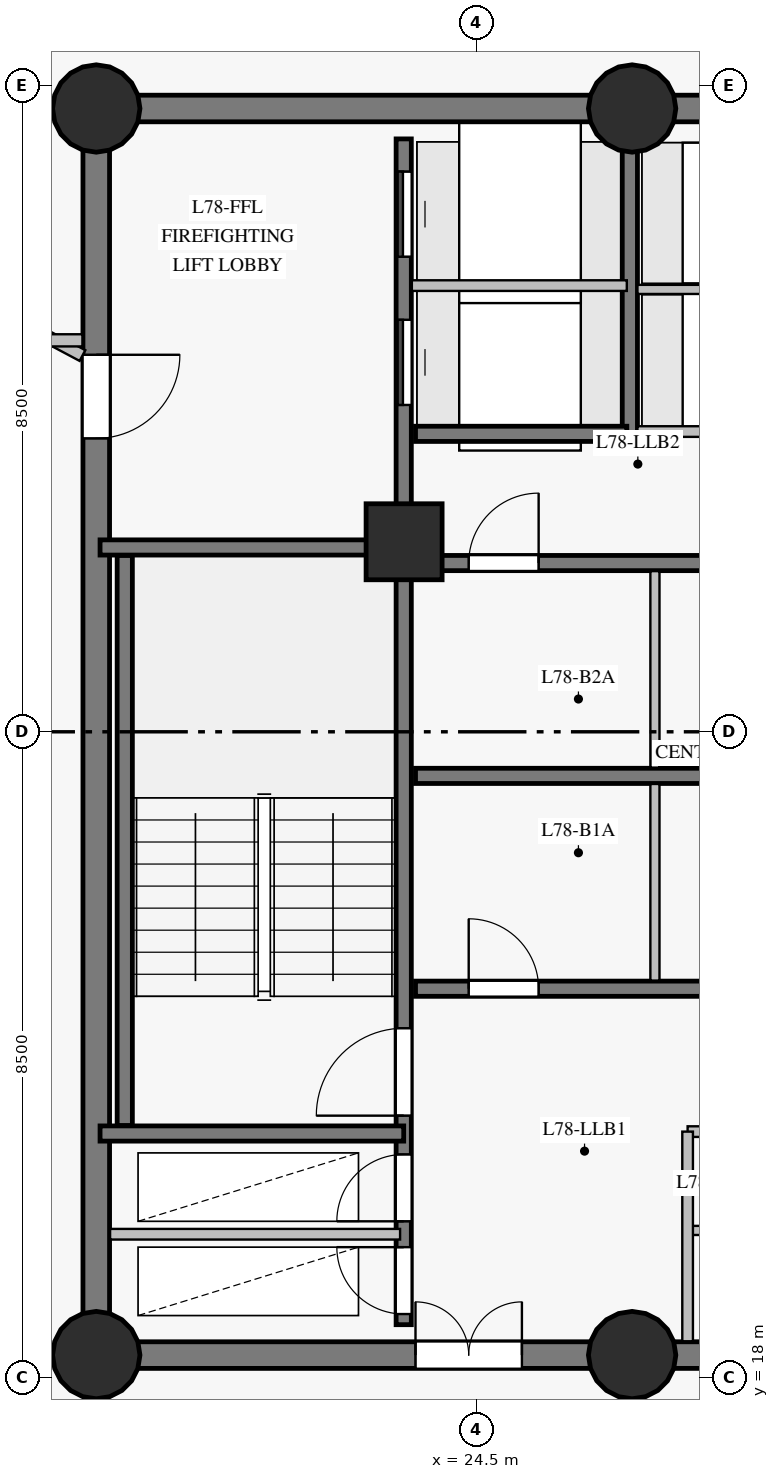
"""IFC4 building model, lengths in metres.
Left out: names, types, materials, properties, quantities, classifications, styles, units other than length and angle.
Written with IfcOpenShell. Run it as: python <this file> out.ifc"""

import sys

from ifc_helpers import new_model, si_unit, direction, frame, frame_2d, origin, origin_with_axes, origin_2d, place, context, subcontext, project, spatial, rectangle, circle, extrude, source, transform, mapped, element, fill, save


model = new_model("IFC4")
c1 = context("Model", 3, precision=1e-05, world=origin(), true_north=direction((0.0, 1.0)))
c2 = subcontext(c1, "Body", "Model", "MODEL_VIEW")
j1 = project(units=[si_unit("LENGTHUNIT", "METRE"), si_unit("PLANEANGLEUNIT", "RADIAN")], contexts=[c1])
p1 = place(None, origin())
s1 = spatial("IfcSite", under=j1, at=p1, CompositionType="ELEMENT")
p2 = place(p1, origin())
s2 = spatial("IfcBuilding", under=s1, at=p2, CompositionType="ELEMENT")
p3 = place(p2, frame((0.0, 0.0, 262.65)))
s3 = spatial("IfcBuildingStorey", under=s2, at=p3, CompositionType="ELEMENT", Elevation=262.65)
p4 = place(p3, frame((19.5, 18.3, 0.0), z_axis=(0.0, 0.0, 1.0), x_axis=(1.0, 0.0, 0.0)))
e1 = element("IfcWall", 1, at=p4, inside=s3, PredefinedType="SHEAR", context=c2, shape_type="SweptSolid", body=[
    extrude(rectangle(XDim=7.05, YDim=0.35, at=frame_2d((3.525, 0.0))), origin(), (0.0, 0.0, 1.0), 2.85),
])
p5 = place(p4, frame((4.2, 0.0, 0.0)))
e2 = element("IfcOpeningElement", 2, at=p5, cuts=e1, PredefinedType="OPENING", context=c2, shape_type="SweptSolid", body=[
    extrude(rectangle(XDim=1.4, YDim=2.2, at=frame_2d((0.7, 1.1))), frame((0.0, 0.185, 0.0), z_axis=(0.0, -1.0, 0.0), x_axis=(1.0, 0.0, 0.0)), (0.0, 0.0, 1.0), 0.37),
])
p6 = place(p3, frame((26.55, 18.3, 0.0), z_axis=(0.0, 0.0, 1.0), x_axis=(1.0, 0.0, 0.0)))
e3 = element("IfcWall", 3, at=p6, inside=s3, PredefinedType="SHEAR", context=c2, shape_type="SweptSolid", body=[
    extrude(rectangle(XDim=10.95, YDim=0.35, at=frame_2d((5.475, 0.0))), origin(), (0.0, 0.0, 1.0), 2.85),
])
p7 = place(p6, frame((4.55, 0.0, 0.0)))
e4 = element("IfcOpeningElement", 4, at=p7, cuts=e3, PredefinedType="OPENING", context=c2, shape_type="SweptSolid", body=[
    extrude(rectangle(XDim=1.4, YDim=2.2, at=frame_2d((0.7, 1.1))), frame((0.0, 0.185, 0.0), z_axis=(0.0, -1.0, 0.0), x_axis=(1.0, 0.0, 0.0)), (0.0, 0.0, 1.0), 0.37),
])
p8 = place(p3, frame((37.5, 34.7, 0.0), z_axis=(0.0, 0.0, 1.0), x_axis=(-1.0, 0.0, 0.0)))
e5 = element("IfcWall", 5, at=p8, inside=s3, PredefinedType="SHEAR", context=c2, shape_type="SweptSolid", body=[
    extrude(rectangle(XDim=10.95, YDim=0.35, at=frame_2d((5.475, 0.0))), origin(), (0.0, 0.0, 1.0), 2.85),
])
p9 = place(p8, frame((2.15, 0.0, 0.0)))
e6 = element("IfcOpeningElement", 6, at=p9, cuts=e5, PredefinedType="OPENING", context=c2, shape_type="SweptSolid", body=[
    extrude(rectangle(XDim=1.2, YDim=2.15, at=frame_2d((0.6, 1.075))), frame((0.0, 0.185, 0.0), z_axis=(0.0, -1.0, 0.0), x_axis=(1.0, 0.0, 0.0)), (0.0, 0.0, 1.0), 0.37),
])
p10 = place(p8, frame((6.35, 0.0, 0.0)))
e7 = element("IfcOpeningElement", 7, at=p10, cuts=e5, PredefinedType="OPENING", context=c2, shape_type="SweptSolid", body=[
    extrude(rectangle(XDim=1.1, YDim=2.15, at=frame_2d((0.55, 1.075))), frame((0.0, 0.185, 0.0), z_axis=(0.0, -1.0, 0.0), x_axis=(1.0, 0.0, 0.0)), (0.0, 0.0, 1.0), 0.37),
])
p11 = place(p3, frame((26.55, 34.7, 0.0), z_axis=(0.0, 0.0, 1.0), x_axis=(-1.0, 0.0, 0.0)))
e8 = element("IfcWall", 8, at=p11, inside=s3, PredefinedType="SHEAR", context=c2, shape_type="SweptSolid", body=[
    extrude(rectangle(XDim=7.05, YDim=0.35, at=frame_2d((3.525, 0.0))), origin(), (0.0, 0.0, 1.0), 2.85),
])
p12 = place(p3, frame((19.5, 34.7, 0.0), z_axis=(0.0, 0.0, 1.0), x_axis=(0.0, -1.0, 0.0)))
e9 = element("IfcWall", 9, at=p12, inside=s3, PredefinedType="SHEAR", context=c2, shape_type="SweptSolid", body=[
    extrude(rectangle(XDim=16.4, YDim=0.35, at=frame_2d((8.2, 0.0))), origin(), (0.0, 0.0, 1.0), 2.85),
])
p13 = place(p12, frame((3.24, 0.0, 0.0)))
e10 = element("IfcOpeningElement", 10, at=p13, cuts=e9, PredefinedType="OPENING", context=c2, shape_type="SweptSolid", body=[
    extrude(rectangle(XDim=1.1, YDim=2.15, at=frame_2d((0.55, 1.075))), frame((0.0, 0.185, 0.0), z_axis=(0.0, -1.0, 0.0), x_axis=(1.0, 0.0, 0.0)), (0.0, 0.0, 1.0), 0.37),
])
m1 = source(origin_with_axes(), c2, "Body", "SweptSolid", [
    extrude(circle(Radius=0.575, at=origin_2d()), origin(), (0.0, 0.0, 1.0), 3.05),
])
for number, where, z_axis, x_axis in (
    (11, (19.5, 18.3, 0.0), (0.0, 0.0, 1.0), (1.0, 0.0, 0.0)),
    (12, (26.55, 18.3, 0.0), (0.0, 0.0, 1.0), (1.0, 0.0, 0.0)),
    (13, (19.5, 34.7, 0.0), (0.0, 0.0, 1.0), (1.0, 0.0, 0.0)),
    (14, (26.55, 34.7, 0.0), (0.0, 0.0, 1.0), (1.0, 0.0, 0.0)),
):
    element("IfcColumn", number, at=place(p3, frame(where, z_axis=z_axis, x_axis=x_axis)), inside=s3, PredefinedType="COLUMN", context=c2, shape_type="MappedRepresentation", body=[
        mapped(m1, transform((0.0, 0.0, 0.0), scale=1.0)),
    ])
m2 = source(origin_with_axes(), c2, "Body", "SweptSolid", [
    extrude(rectangle(XDim=1.0, YDim=1.0, at=origin_2d()), origin(), (0.0, 0.0, 1.0), 3.05),
])
p14 = place(p3, frame((23.55, 29.0, 0.0), z_axis=(0.0, 0.0, 1.0), x_axis=(1.0, 0.0, 0.0)))
e15 = element("IfcColumn", 15, at=p14, inside=s3, PredefinedType="COLUMN", context=c2, shape_type="MappedRepresentation", body=[
    mapped(m2, transform((0.0, 0.0, 0.0), scale=1.0)),
])
p15 = place(p3, frame((23.545, 18.7, 0.0), z_axis=(0.0, 0.0, 1.0), x_axis=(0.0, 1.0, 0.0)))
e16 = element("IfcWall", 16, at=p15, inside=s3, PredefinedType="SHEAR", context=c2, shape_type="SweptSolid", body=[
    extrude(rectangle(XDim=15.6, YDim=0.2, at=frame_2d((7.8, 0.0))), origin(), (0.0, 0.0, 1.0), 2.85),
])
p16 = place(p15, frame((2.75, 0.0, 0.0)))
e17 = element("IfcOpeningElement", 17, at=p16, cuts=e16, PredefinedType="OPENING", context=c2, shape_type="SweptSolid", body=[
    extrude(rectangle(XDim=1.15, YDim=2.15, at=frame_2d((0.575, 1.075))), frame((0.0, 0.11, 0.0), z_axis=(0.0, -1.0, 0.0), x_axis=(1.0, 0.0, 0.0)), (0.0, 0.0, 1.0), 0.22),
])
p17 = place(p15, frame((0.14, 0.0, 0.0)))
e18 = element("IfcOpeningElement", 18, at=p17, cuts=e16, PredefinedType="OPENING", context=c2, shape_type="SweptSolid", body=[
    extrude(rectangle(XDim=0.88, YDim=2.1, at=frame_2d((0.44, 1.05))), frame((0.0, 0.11, 0.0), z_axis=(0.0, -1.0, 0.0), x_axis=(1.0, 0.0, 0.0)), (0.0, 0.0, 1.0), 0.22),
])
p18 = place(p15, frame((1.36, 0.0, 0.0)))
e19 = element("IfcOpeningElement", 19, at=p18, cuts=e16, PredefinedType="OPENING", context=c2, shape_type="SweptSolid", body=[
    extrude(rectangle(XDim=0.88, YDim=2.1, at=frame_2d((0.44, 1.05))), frame((0.0, 0.11, 0.0), z_axis=(0.0, -1.0, 0.0), x_axis=(1.0, 0.0, 0.0)), (0.0, 0.0, 1.0), 0.22),
])
p19 = place(p15, frame((12.1, 0.0, 0.0)))
e20 = element("IfcOpeningElement", 20, at=p19, cuts=e16, PredefinedType="OPENING", context=c2, shape_type="SweptSolid", body=[
    extrude(rectangle(XDim=1.12, YDim=2.15, at=frame_2d((0.56, 1.075))), frame((0.0, 0.11, 0.0), z_axis=(0.0, -1.0, 0.0), x_axis=(1.0, 0.0, 0.0)), (0.0, 0.0, 1.0), 0.22),
])
p20 = place(p15, frame((14.05, 0.0, 0.0)))
e21 = element("IfcOpeningElement", 21, at=p20, cuts=e16, PredefinedType="OPENING", context=c2, shape_type="SweptSolid", body=[
    extrude(rectangle(XDim=1.12, YDim=2.15, at=frame_2d((0.56, 1.075))), frame((0.0, 0.11, 0.0), z_axis=(0.0, -1.0, 0.0), x_axis=(1.0, 0.0, 0.0)), (0.0, 0.0, 1.0), 0.22),
])
p21 = place(p3, frame((23.7, 23.12, 0.0), z_axis=(0.0, 0.0, 1.0), x_axis=(1.0, 0.0, 0.0)))
e22 = element("IfcWall", 22, at=p21, inside=s3, PredefinedType="SHEAR", context=c2, shape_type="SweptSolid", body=[
    extrude(rectangle(XDim=9.6, YDim=0.2, at=frame_2d((4.8, 0.0))), origin(), (0.0, 0.0, 1.0), 2.85),
])
p22 = place(p21, frame((0.7, 0.0, 0.0)))
e23 = element("IfcOpeningElement", 23, at=p22, cuts=e22, PredefinedType="OPENING", context=c2, shape_type="SweptSolid", body=[
    extrude(rectangle(XDim=0.92, YDim=2.1, at=frame_2d((0.46, 1.05))), frame((0.0, 0.11, 0.0), z_axis=(0.0, -1.0, 0.0), x_axis=(1.0, 0.0, 0.0)), (0.0, 0.0, 1.0), 0.22),
])
p23 = place(p21, frame((4.2, 0.0, 0.0)))
e24 = element("IfcOpeningElement", 24, at=p23, cuts=e22, PredefinedType="OPENING", context=c2, shape_type="SweptSolid", body=[
    extrude(rectangle(XDim=0.92, YDim=2.1, at=frame_2d((0.46, 1.05))), frame((0.0, 0.11, 0.0), z_axis=(0.0, -1.0, 0.0), x_axis=(1.0, 0.0, 0.0)), (0.0, 0.0, 1.0), 0.22),
])
p24 = place(p21, frame((7.45, 0.0, 0.0)))
e25 = element("IfcOpeningElement", 25, at=p24, cuts=e22, PredefinedType="OPENING", context=c2, shape_type="SweptSolid", body=[
    extrude(rectangle(XDim=0.92, YDim=2.1, at=frame_2d((0.46, 1.05))), frame((0.0, 0.11, 0.0), z_axis=(0.0, -1.0, 0.0), x_axis=(1.0, 0.0, 0.0)), (0.0, 0.0, 1.0), 0.22),
])
p25 = place(p3, frame((23.7, 25.92, 0.0), z_axis=(0.0, 0.0, 1.0), x_axis=(1.0, 0.0, 0.0)))
e26 = element("IfcWall", 26, at=p25, inside=s3, PredefinedType="SHEAR", context=c2, shape_type="SweptSolid", body=[
    extrude(rectangle(XDim=9.6, YDim=0.2, at=frame_2d((4.8, 0.0))), origin(), (0.0, 0.0, 1.0), 2.85),
])
p26 = place(p3, frame((23.7, 28.72, 0.0), z_axis=(0.0, 0.0, 1.0), x_axis=(1.0, 0.0, 0.0)))
e27 = element("IfcWall", 27, at=p26, inside=s3, PredefinedType="SHEAR", context=c2, shape_type="SweptSolid", body=[
    extrude(rectangle(XDim=9.6, YDim=0.2, at=frame_2d((4.8, 0.0))), origin(), (0.0, 0.0, 1.0), 2.85),
])
p27 = place(p26, frame((0.7, 0.0, 0.0)))
e28 = element("IfcOpeningElement", 28, at=p27, cuts=e27, PredefinedType="OPENING", context=c2, shape_type="SweptSolid", body=[
    extrude(rectangle(XDim=0.92, YDim=2.1, at=frame_2d((0.46, 1.05))), frame((0.0, 0.11, 0.0), z_axis=(0.0, -1.0, 0.0), x_axis=(1.0, 0.0, 0.0)), (0.0, 0.0, 1.0), 0.22),
])
p28 = place(p26, frame((4.2, 0.0, 0.0)))
e29 = element("IfcOpeningElement", 29, at=p28, cuts=e27, PredefinedType="OPENING", context=c2, shape_type="SweptSolid", body=[
    extrude(rectangle(XDim=0.92, YDim=2.1, at=frame_2d((0.46, 1.05))), frame((0.0, 0.11, 0.0), z_axis=(0.0, -1.0, 0.0), x_axis=(1.0, 0.0, 0.0)), (0.0, 0.0, 1.0), 0.22),
])
p29 = place(p26, frame((7.45, 0.0, 0.0)))
e30 = element("IfcOpeningElement", 30, at=p29, cuts=e27, PredefinedType="OPENING", context=c2, shape_type="SweptSolid", body=[
    extrude(rectangle(XDim=0.92, YDim=2.1, at=frame_2d((0.46, 1.05))), frame((0.0, 0.11, 0.0), z_axis=(0.0, -1.0, 0.0), x_axis=(1.0, 0.0, 0.0)), (0.0, 0.0, 1.0), 0.22),
])
p30 = place(p3, frame((19.875, 21.32, 0.0), z_axis=(0.0, 0.0, 1.0), x_axis=(0.0, 1.0, 0.0)))
e31 = element("IfcWall", 31, at=p30, inside=s3, PredefinedType="SHEAR", context=c2, shape_type="SweptSolid", body=[
    extrude(rectangle(XDim=7.5, YDim=0.2, at=frame_2d((3.75, 0.0))), origin(), (0.0, 0.0, 1.0), 2.85),
])
for number, where, z_axis, x_axis in (
    (32, (19.55, 21.215, 0.0), (0.0, 0.0, 1.0), (1.0, 0.0, 0.0)),
    (33, (19.55, 28.925, 0.0), (0.0, 0.0, 1.0), (1.0, 0.0, 0.0)),
):
    element("IfcWall", number, at=place(p3, frame(where, z_axis=z_axis, x_axis=x_axis)), inside=s3, PredefinedType="SHEAR", context=c2, shape_type="SweptSolid", body=[
        extrude(rectangle(XDim=3.995, YDim=0.2, at=frame_2d((1.998, 0.0))), origin(), (0.0, 0.0, 1.0), 2.85),
    ])
p31 = place(p3, frame((26.52, 30.42, 0.0), z_axis=(0.0, 0.0, 1.0), x_axis=(0.0, 1.0, 0.0)))
e34 = element("IfcWall", 34, at=p31, inside=s3, PredefinedType="SHEAR", context=c2, shape_type="SweptSolid", body=[
    extrude(rectangle(XDim=3.86, YDim=0.2, at=frame_2d((1.93, 0.0))), origin(), (0.0, 0.0, 1.0), 2.85),
])
p32 = place(p3, frame((23.7, 30.42, 0.0), z_axis=(0.0, 0.0, 1.0), x_axis=(1.0, 0.0, 0.0)))
e35 = element("IfcWall", 35, at=p32, inside=s3, PredefinedType="SHEAR", context=c2, shape_type="SweptSolid", body=[
    extrude(rectangle(XDim=2.78, YDim=0.2, at=frame_2d((1.39, 0.0))), origin(), (0.0, 0.0, 1.0), 2.85),
])
p33 = place(p3, frame((19.319, 31.45, 0.0), z_axis=(0.0, 0.0, 1.0), x_axis=(-0.882939910426, 0.469486011055, 0.0)))
e36 = element("IfcWall", 36, at=p33, inside=s3, PredefinedType="PARTITIONING", context=c2, shape_type="SweptSolid", body=[
    extrude(rectangle(XDim=6.889, YDim=0.16, at=frame_2d((3.444, 0.0))), origin(), (0.0, 0.0, 1.0), 2.85),
])
p34 = place(p3, frame((19.682, 19.89, 0.0), z_axis=(0.0, 0.0, 1.0), x_axis=(1.0, 0.0, 0.0)))
e37 = element("IfcWall", 37, at=p34, inside=s3, PredefinedType="PARTITIONING", context=c2, shape_type="SweptSolid", body=[
    extrude(rectangle(XDim=3.815, YDim=0.14, at=frame_2d((1.908, 0.0))), origin(), (0.0, 0.0, 1.0), 2.85),
])
p35 = place(p3, frame((27.28, 21.24, 0.0), z_axis=(0.0, 0.0, 1.0), x_axis=(1.0, 0.0, 0.0)))
e38 = element("IfcWall", 38, at=p35, inside=s3, PredefinedType="PARTITIONING", context=c2, shape_type="SweptSolid", body=[
    extrude(rectangle(XDim=3.44, YDim=0.14, at=frame_2d((1.72, 0.0))), origin(), (0.0, 0.0, 1.0), 2.85),
])
p36 = place(p35, frame((1.15, 0.0, 0.0)))
e39 = element("IfcOpeningElement", 39, at=p36, cuts=e38, PredefinedType="OPENING", context=c2, shape_type="SweptSolid", body=[
    extrude(rectangle(XDim=0.92, YDim=2.1, at=frame_2d((0.46, 1.05))), frame((0.0, 0.08, 0.0), z_axis=(0.0, -1.0, 0.0), x_axis=(1.0, 0.0, 0.0)), (0.0, 0.0, 1.0), 0.16),
])
p37 = place(p3, frame((27.28, 19.94, 0.0), z_axis=(0.0, 0.0, 1.0), x_axis=(1.0, 0.0, 0.0)))
e40 = element("IfcWall", 40, at=p37, inside=s3, PredefinedType="PARTITIONING", context=c2, shape_type="SweptSolid", body=[
    extrude(rectangle(XDim=3.44, YDim=0.12, at=frame_2d((1.72, 0.0))), origin(), (0.0, 0.0, 1.0), 2.85),
])
p38 = place(p3, frame((23.652, 32.37, 0.0), z_axis=(0.0, 0.0, 1.0), x_axis=(1.0, 0.0, 0.0)))
e41 = element("IfcWall", 41, at=p38, inside=s3, PredefinedType="PARTITIONING", context=c2, shape_type="SweptSolid", body=[
    extrude(rectangle(XDim=2.828, YDim=0.14, at=frame_2d((1.414, 0.0))), origin(), (0.0, 0.0, 1.0), 2.85),
])
p39 = place(p3, frame((27.28, 18.482, 0.0), z_axis=(0.0, 0.0, 1.0), x_axis=(0.0, 1.0, 0.0)))
e42 = element("IfcWall", 42, at=p39, inside=s3, PredefinedType="PARTITIONING", context=c2, shape_type="SweptSolid", body=[
    extrude(rectangle(XDim=2.758, YDim=0.14, at=frame_2d((1.379, 0.0))), origin(), (0.0, 0.0, 1.0), 2.85),
])
p40 = place(p3, frame((26.62, 30.45, 0.0), z_axis=(0.0, 0.0, 1.0), x_axis=(1.0, 0.0, 0.0)))
e43 = element("IfcWall", 43, at=p40, inside=s3, PredefinedType="PARTITIONING", context=c2, shape_type="SweptSolid", body=[
    extrude(rectangle(XDim=2.58, YDim=0.14, at=frame_2d((1.29, 0.0))), origin(), (0.0, 0.0, 1.0), 2.85),
])
p41 = place(p3, frame((26.62, 32.32, 0.0), z_axis=(0.0, 0.0, 1.0), x_axis=(1.0, 0.0, 0.0)))
e44 = element("IfcWall", 44, at=p41, inside=s3, PredefinedType="PARTITIONING", context=c2, shape_type="SweptSolid", body=[
    extrude(rectangle(XDim=2.58, YDim=0.12, at=frame_2d((1.29, 0.0))), origin(), (0.0, 0.0, 1.0), 2.85),
])
p42 = place(p3, frame((16.75, 31.65, 0.0), z_axis=(0.0, 0.0, 1.0), x_axis=(1.0, 0.0, 0.0)))
e45 = element("IfcWall", 45, at=p42, inside=s3, PredefinedType="PARTITIONING", context=c2, shape_type="SweptSolid", body=[
    extrude(rectangle(XDim=2.568, YDim=0.16, at=frame_2d((1.284, 0.0))), origin(), (0.0, 0.0, 1.0), 2.85),
])
for number, where, z_axis, x_axis in (
    (46, (26.85, 23.227, 0.0), (0.0, 0.0, 1.0), (0.0, 1.0, 0.0)),
    (47, (26.85, 26.027, 0.0), (0.0, 0.0, 1.0), (0.0, 1.0, 0.0)),
):
    element("IfcWall", number, at=place(p3, frame(where, z_axis=z_axis, x_axis=x_axis)), inside=s3, PredefinedType="PARTITIONING", context=c2, shape_type="SweptSolid", body=[
        extrude(rectangle(XDim=2.587, YDim=0.12, at=frame_2d((1.293, 0.0))), origin(), (0.0, 0.0, 1.0), 2.85),
    ])
m3 = source(origin_with_axes(), c2, "Body", "SweptSolid", [
    extrude(rectangle(XDim=1.15, YDim=2.15, at=frame_2d((0.575, 1.075))), frame((0.0, 0.025, 0.0), z_axis=(0.0, -1.0, 0.0), x_axis=(1.0, 0.0, 0.0)), (0.0, 0.0, 1.0), 0.05),
])
p43 = place(p16, origin())
e48 = element("IfcDoor", 48, at=p43, inside=s3, OperationType="SINGLE_SWING_LEFT", PredefinedType="DOOR", context=c2, shape_type="MappedRepresentation", body=[
    mapped(m3, transform((0.0, 0.0, 0.0), scale=1.0)),
])
fill(e17, e48)
m4 = source(origin_with_axes(), c2, "Body", "SweptSolid", [
    extrude(rectangle(XDim=1.1, YDim=2.15, at=frame_2d((0.55, 1.075))), frame((0.0, 0.025, 0.0), z_axis=(0.0, -1.0, 0.0), x_axis=(1.0, 0.0, 0.0)), (0.0, 0.0, 1.0), 0.05),
])
p44 = place(p13, origin())
e49 = element("IfcDoor", 49, at=p44, inside=s3, OperationType="SINGLE_SWING_LEFT", PredefinedType="DOOR", context=c2, shape_type="MappedRepresentation", body=[
    mapped(m4, transform((0.0, 0.0, 0.0), scale=1.0)),
])
fill(e10, e49)
m5 = source(origin_with_axes(), c2, "Body", "SweptSolid", [
    extrude(rectangle(XDim=0.88, YDim=2.1, at=frame_2d((0.44, 1.05))), frame((0.0, 0.025, 0.0), z_axis=(0.0, -1.0, 0.0), x_axis=(1.0, 0.0, 0.0)), (0.0, 0.0, 1.0), 0.05),
])
p45 = place(p17, origin())
e50 = element("IfcDoor", 50, at=p45, inside=s3, OperationType="SINGLE_SWING_RIGHT", PredefinedType="DOOR", context=c2, shape_type="MappedRepresentation", body=[
    mapped(m5, transform((0.0, 0.0, 0.0), scale=1.0)),
])
fill(e18, e50)
p46 = place(p18, origin())
e51 = element("IfcDoor", 51, at=p46, inside=s3, OperationType="SINGLE_SWING_LEFT", PredefinedType="DOOR", context=c2, shape_type="MappedRepresentation", body=[
    mapped(m5, transform((0.0, 0.0, 0.0), scale=1.0)),
])
fill(e19, e51)
m6 = source(origin_with_axes(), c2, "Body", "SweptSolid", [
    extrude(rectangle(XDim=1.4, YDim=2.2, at=frame_2d((0.7, 1.1))), frame((0.0, 0.025, 0.0), z_axis=(0.0, -1.0, 0.0), x_axis=(1.0, 0.0, 0.0)), (0.0, 0.0, 1.0), 0.05),
])
p47 = place(p5, origin())
e52 = element("IfcDoor", 52, at=p47, inside=s3, OperationType="DOUBLE_DOOR_SINGLE_SWING", PredefinedType="DOOR", context=c2, shape_type="MappedRepresentation", body=[
    mapped(m6, transform((0.0, 0.0, 0.0), scale=1.0)),
])
fill(e2, e52)
m7 = source(origin_with_axes(), c2, "Body", "SweptSolid", [
    extrude(rectangle(XDim=0.92, YDim=2.1, at=frame_2d((0.46, 1.05))), frame((0.0, 0.025, 0.0), z_axis=(0.0, -1.0, 0.0), x_axis=(1.0, 0.0, 0.0)), (0.0, 0.0, 1.0), 0.05),
])
p48 = place(p22, origin())
e53 = element("IfcDoor", 53, at=p48, inside=s3, OperationType="SINGLE_SWING_LEFT", PredefinedType="DOOR", context=c2, shape_type="MappedRepresentation", body=[
    mapped(m7, transform((0.0, 0.0, 0.0), scale=1.0)),
])
fill(e23, e53)
p49 = place(p27, origin())
e54 = element("IfcDoor", 54, at=p49, inside=s3, OperationType="SINGLE_SWING_RIGHT", PredefinedType="DOOR", context=c2, shape_type="MappedRepresentation", body=[
    mapped(m7, transform((0.0, 0.0, 0.0), scale=1.0)),
])
fill(e28, e54)
m8 = source(origin_with_axes(), c2, "Body", "SweptSolid", [
    extrude(rectangle(XDim=1.12, YDim=2.15, at=frame_2d((0.56, 1.075))), frame((0.0, 0.025, 0.0), z_axis=(0.0, -1.0, 0.0), x_axis=(1.0, 0.0, 0.0)), (0.0, 0.0, 1.0), 0.05),
])
p50 = place(p19, origin())
e55 = element("IfcDoor", 55, at=p50, inside=s3, OperationType="SLIDING_TO_LEFT", PredefinedType="DOOR", context=c2, shape_type="MappedRepresentation", body=[
    mapped(m8, transform((0.0, 0.0, 0.0), scale=1.0)),
])
fill(e20, e55)
p51 = place(p20, origin())
e56 = element("IfcDoor", 56, at=p51, inside=s3, OperationType="SLIDING_TO_RIGHT", PredefinedType="DOOR", context=c2, shape_type="MappedRepresentation", body=[
    mapped(m8, transform((0.0, 0.0, 0.0), scale=1.0)),
])
fill(e21, e56)
save(model, sys.argv[1])
